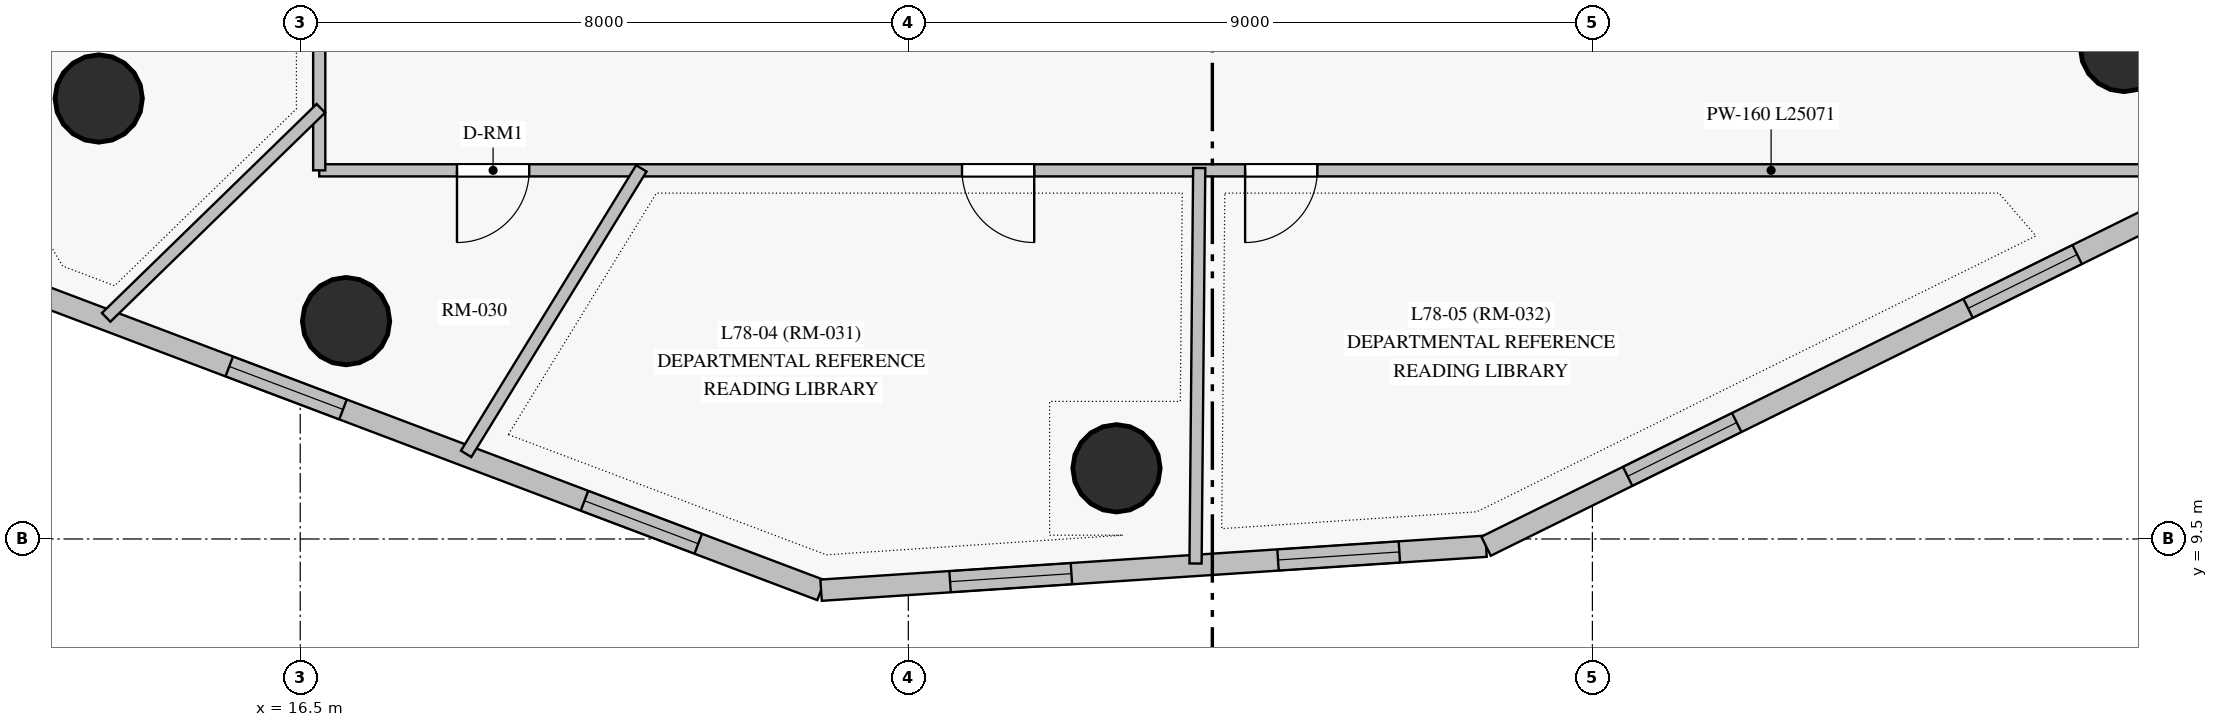
"""IFC4 building model, lengths in metres.
Left out: names, types, materials, properties, quantities, classifications, styles, units other than length and angle.
Written with IfcOpenShell. Run it as: python <this file> out.ifc"""

import sys

from ifc_helpers import new_model, si_unit, direction, frame, frame_2d, origin, origin_with_axes, origin_2d, place, context, subcontext, project, spatial, rectangle, circle, extrude, source, transform, mapped, element, fill, save


model = new_model("IFC4")
c1 = context("Model", 3, precision=1e-05, world=origin(), true_north=direction((0.0, 1.0)))
c2 = subcontext(c1, "Body", "Model", "MODEL_VIEW")
j1 = project(units=[si_unit("LENGTHUNIT", "METRE"), si_unit("PLANEANGLEUNIT", "RADIAN")], contexts=[c1])
p1 = place(None, origin())
s1 = spatial("IfcSite", under=j1, at=p1, CompositionType="ELEMENT")
p2 = place(p1, origin())
s2 = spatial("IfcBuilding", under=s1, at=p2, CompositionType="ELEMENT")
p3 = place(p2, frame((0.0, 0.0, 262.65)))
s3 = spatial("IfcBuildingStorey", under=s2, at=p3, CompositionType="ELEMENT", Elevation=262.65)
m1 = source(origin_with_axes(), c2, "Body", "SweptSolid", [
    extrude(circle(Radius=0.575, at=origin_2d()), origin(), (0.0, 0.0, 1.0), 3.05),
])
for number, where, z_axis, x_axis in (
    (1, (13.849, 15.295, 0.0), (0.0, 0.0, 1.0), (1.0, 0.0, 0.0)),
    (2, (17.103, 12.366, 0.0), (0.0, 0.0, 1.0), (1.0, 0.0, 0.0)),
    (3, (27.239, 10.43, 0.0), (0.0, 0.0, 1.0), (1.0, 0.0, 0.0)),
    (4, (40.494, 15.96, 0.0), (0.0, 0.0, 1.0), (1.0, 0.0, 0.0)),
):
    element("IfcColumn", number, at=place(p3, frame(where, z_axis=z_axis, x_axis=x_axis)), inside=s3, PredefinedType="COLUMN", context=c2, shape_type="MappedRepresentation", body=[
        mapped(m1, transform((0.0, 0.0, 0.0), scale=1.0)),
    ])
p4 = place(p3, frame((13.062, 12.717, 0.0), z_axis=(0.0, 0.0, 1.0), x_axis=(0.935383697979, -0.353634468844, 0.0)))
e5 = element("IfcWall", 5, at=p4, inside=s3, PredefinedType="SOLIDWALL", context=c2, shape_type="SweptSolid", body=[
    extrude(rectangle(XDim=11.001, YDim=0.28, at=frame_2d((5.5, 0.0))), origin(), (0.0, 0.0, 1.0), 2.85),
])
p5 = place(p4, frame((2.677, 0.0, 0.85)))
e6 = element("IfcOpeningElement", 6, at=p5, cuts=e5, PredefinedType="OPENING", context=c2, shape_type="SweptSolid", body=[
    extrude(rectangle(XDim=1.6, YDim=1.6, at=frame_2d((0.8, 0.8))), frame((0.0, 0.15, 0.0), z_axis=(0.0, -1.0, 0.0), x_axis=(1.0, 0.0, 0.0)), (0.0, 0.0, 1.0), 0.3),
])
p6 = place(p4, frame((7.673, 0.0, 0.85)))
e7 = element("IfcOpeningElement", 7, at=p6, cuts=e5, PredefinedType="OPENING", context=c2, shape_type="SweptSolid", body=[
    extrude(rectangle(XDim=1.6, YDim=1.6, at=frame_2d((0.8, 0.8))), frame((0.0, 0.15, 0.0), z_axis=(0.0, -1.0, 0.0), x_axis=(1.0, 0.0, 0.0)), (0.0, 0.0, 1.0), 0.3),
])
p7 = place(p3, frame((23.353, 8.826, 0.0), z_axis=(0.0, 0.0, 1.0), x_axis=(0.997820011646, 0.06599412367, 0.0)))
e8 = element("IfcWall", 8, at=p7, inside=s3, PredefinedType="SOLIDWALL", context=c2, shape_type="SweptSolid", body=[
    extrude(rectangle(XDim=8.768, YDim=0.28, at=frame_2d((4.384, 0.0))), origin(), (0.0, 0.0, 1.0), 2.85),
])
p8 = place(p7, frame((1.701, 0.0, 0.85)))
e9 = element("IfcOpeningElement", 9, at=p8, cuts=e8, PredefinedType="OPENING", context=c2, shape_type="SweptSolid", body=[
    extrude(rectangle(XDim=1.6, YDim=1.6, at=frame_2d((0.8, 0.8))), frame((0.0, 0.15, 0.0), z_axis=(0.0, -1.0, 0.0), x_axis=(1.0, 0.0, 0.0)), (0.0, 0.0, 1.0), 0.3),
])
p9 = place(p7, frame((6.024, 0.0, 0.85)))
e10 = element("IfcOpeningElement", 10, at=p9, cuts=e8, PredefinedType="OPENING", context=c2, shape_type="SweptSolid", body=[
    extrude(rectangle(XDim=1.6, YDim=1.6, at=frame_2d((0.8, 0.8))), frame((0.0, 0.15, 0.0), z_axis=(0.0, -1.0, 0.0), x_axis=(1.0, 0.0, 0.0)), (0.0, 0.0, 1.0), 0.3),
])
p10 = place(p3, frame((32.101, 9.405, 0.0), z_axis=(0.0, 0.0, 1.0), x_axis=(0.896764199355, 0.442508723931, 0.0)))
e11 = element("IfcWall", 11, at=p10, inside=s3, PredefinedType="SOLIDWALL", context=c2, shape_type="SweptSolid", body=[
    extrude(rectangle(XDim=11.93, YDim=0.28, at=frame_2d((5.965, 0.0))), origin(), (0.0, 0.0, 1.0), 2.85),
])
p11 = place(p10, frame((2.077, 0.0, 0.85)))
e12 = element("IfcOpeningElement", 12, at=p11, cuts=e11, PredefinedType="OPENING", context=c2, shape_type="SweptSolid", body=[
    extrude(rectangle(XDim=1.6, YDim=1.6, at=frame_2d((0.8, 0.8))), frame((0.0, 0.15, 0.0), z_axis=(0.0, -1.0, 0.0), x_axis=(1.0, 0.0, 0.0)), (0.0, 0.0, 1.0), 0.3),
])
p12 = place(p10, frame((7.072, 0.0, 0.85)))
e13 = element("IfcOpeningElement", 13, at=p12, cuts=e11, PredefinedType="OPENING", context=c2, shape_type="SweptSolid", body=[
    extrude(rectangle(XDim=1.6, YDim=1.6, at=frame_2d((0.8, 0.8))), frame((0.0, 0.15, 0.0), z_axis=(0.0, -1.0, 0.0), x_axis=(1.0, 0.0, 0.0)), (0.0, 0.0, 1.0), 0.3),
])
p13 = place(p3, frame((41.821, 14.35, 0.0), z_axis=(0.0, 0.0, 1.0), x_axis=(-1.0, 0.0, 0.0)))
e14 = element("IfcWall", 14, at=p13, inside=s3, PredefinedType="PARTITIONING", context=c2, shape_type="SweptSolid", body=[
    extrude(rectangle(XDim=25.071, YDim=0.16, at=frame_2d((12.536, 0.0))), origin(), (0.0, 0.0, 1.0), 2.3),
])
p14 = place(p13, frame((22.309, 0.0, 0.0)))
e15 = element("IfcOpeningElement", 15, at=p14, cuts=e14, PredefinedType="OPENING", context=c2, shape_type="SweptSolid", body=[
    extrude(rectangle(XDim=0.95, YDim=2.15, at=frame_2d((0.475, 1.075))), frame((0.0, 0.09, 0.0), z_axis=(0.0, -1.0, 0.0), x_axis=(1.0, 0.0, 0.0)), (0.0, 0.0, 1.0), 0.18),
])
p15 = place(p13, frame((15.665, 0.0, 0.0)))
e16 = element("IfcOpeningElement", 16, at=p15, cuts=e14, PredefinedType="OPENING", context=c2, shape_type="SweptSolid", body=[
    extrude(rectangle(XDim=0.95, YDim=2.15, at=frame_2d((0.475, 1.075))), frame((0.0, 0.09, 0.0), z_axis=(0.0, -1.0, 0.0), x_axis=(1.0, 0.0, 0.0)), (0.0, 0.0, 1.0), 0.18),
])
p16 = place(p13, frame((11.94, 0.0, 0.0)))
e17 = element("IfcOpeningElement", 17, at=p16, cuts=e14, PredefinedType="OPENING", context=c2, shape_type="SweptSolid", body=[
    extrude(rectangle(XDim=0.95, YDim=2.15, at=frame_2d((0.475, 1.075))), frame((0.0, 0.09, 0.0), z_axis=(0.0, -1.0, 0.0), x_axis=(1.0, 0.0, 0.0)), (0.0, 0.0, 1.0), 0.18),
])
p17 = place(p3, frame((16.75, 14.35, 0.0), z_axis=(0.0, 0.0, 1.0), x_axis=(0.0, 1.0, 0.0)))
e18 = element("IfcWall", 18, at=p17, inside=s3, PredefinedType="PARTITIONING", context=c2, shape_type="SweptSolid", body=[
    extrude(rectangle(XDim=17.3, YDim=0.16, at=frame_2d((8.65, 0.0))), origin(), (0.0, 0.0, 1.0), 2.45),
])
p18 = place(p17, frame((8.865, 0.0, 0.0)))
e19 = element("IfcOpeningElement", 19, at=p18, cuts=e18, PredefinedType="OPENING", context=c2, shape_type="SweptSolid", body=[
    extrude(rectangle(XDim=0.95, YDim=2.15, at=frame_2d((0.475, 1.075))), frame((0.0, 0.09, 0.0), z_axis=(0.0, -1.0, 0.0), x_axis=(1.0, 0.0, 0.0)), (0.0, 0.0, 1.0), 0.18),
])
p19 = place(p17, frame((5.58, 0.0, 0.0)))
e20 = element("IfcOpeningElement", 20, at=p19, cuts=e18, PredefinedType="OPENING", context=c2, shape_type="SweptSolid", body=[
    extrude(rectangle(XDim=0.96, YDim=2.15, at=frame_2d((0.48, 1.075))), frame((0.0, 0.09, 0.0), z_axis=(0.0, -1.0, 0.0), x_axis=(1.0, 0.0, 0.0)), (0.0, 0.0, 1.0), 0.18),
])
p20 = place(p17, frame((10.77, 0.0, 0.0)))
e21 = element("IfcOpeningElement", 21, at=p20, cuts=e18, PredefinedType="OPENING", context=c2, shape_type="SweptSolid", body=[
    extrude(rectangle(XDim=0.95, YDim=2.15, at=frame_2d((0.475, 1.075))), frame((0.0, 0.09, 0.0), z_axis=(0.0, -1.0, 0.0), x_axis=(1.0, 0.0, 0.0)), (0.0, 0.0, 1.0), 0.18),
])
p21 = place(p17, frame((15.523, 0.0, 0.0)))
e22 = element("IfcOpeningElement", 22, at=p21, cuts=e18, PredefinedType="OPENING", context=c2, shape_type="SweptSolid", body=[
    extrude(rectangle(XDim=0.86, YDim=2.04, at=frame_2d((0.43, 1.02))), frame((0.0, 0.09, 0.0), z_axis=(0.0, -1.0, 0.0), x_axis=(1.0, 0.0, 0.0)), (0.0, 0.0, 1.0), 0.18),
])
p22 = place(p3, frame((28.327, 14.38, 0.0), z_axis=(0.0, 0.0, 1.0), x_axis=(-0.009337931662, -0.999956400566, 0.0)))
e23 = element("IfcWall", 23, at=p22, inside=s3, PredefinedType="PARTITIONING", context=c2, shape_type="SweptSolid", body=[
    extrude(rectangle(XDim=5.203, YDim=0.16, at=frame_2d((2.602, 0.0))), origin(), (0.0, 0.0, 1.0), 2.85),
])
p23 = place(p3, frame((20.988, 14.375, 0.0), z_axis=(0.0, 0.0, 1.0), x_axis=(-0.52315433161, -0.852237962847, 0.0)))
e24 = element("IfcWall", 24, at=p23, inside=s3, PredefinedType="PARTITIONING", context=c2, shape_type="SweptSolid", body=[
    extrude(rectangle(XDim=4.407, YDim=0.16, at=frame_2d((2.203, 0.0))), origin(), (0.0, 0.0, 1.0), 2.85),
])
p24 = place(p3, frame((16.771, 15.165, 0.0), z_axis=(0.0, 0.0, 1.0), x_axis=(-0.716518431259, -0.697568159871, 0.0)))
e25 = element("IfcWall", 25, at=p24, inside=s3, PredefinedType="PARTITIONING", context=c2, shape_type="SweptSolid", body=[
    extrude(rectangle(XDim=3.942, YDim=0.16, at=frame_2d((1.971, 0.0))), origin(), (0.0, 0.0, 1.0), 2.85),
])
m2 = source(origin_with_axes(), c2, "Body", "SweptSolid", [
    extrude(rectangle(XDim=1.6, YDim=1.6, at=frame_2d((0.8, 0.8))), frame((0.0, 0.03, 0.0), z_axis=(0.0, -1.0, 0.0), x_axis=(1.0, 0.0, 0.0)), (0.0, 0.0, 1.0), 0.06),
])
p25 = place(p5, origin())
e26 = element("IfcWindow", 26, at=p25, inside=s3, PartitioningType="SINGLE_PANEL", PredefinedType="WINDOW", context=c2, shape_type="MappedRepresentation", body=[
    mapped(m2, transform((0.0, 0.0, 0.0), scale=1.0)),
])
fill(e6, e26)
p26 = place(p6, origin())
e27 = element("IfcWindow", 27, at=p26, inside=s3, PartitioningType="SINGLE_PANEL", PredefinedType="WINDOW", context=c2, shape_type="MappedRepresentation", body=[
    mapped(m2, transform((0.0, 0.0, 0.0), scale=1.0)),
])
fill(e7, e27)
p27 = place(p8, origin())
e28 = element("IfcWindow", 28, at=p27, inside=s3, PartitioningType="SINGLE_PANEL", PredefinedType="WINDOW", context=c2, shape_type="MappedRepresentation", body=[
    mapped(m2, transform((0.0, 0.0, 0.0), scale=1.0)),
])
fill(e9, e28)
p28 = place(p9, origin())
e29 = element("IfcWindow", 29, at=p28, inside=s3, PartitioningType="SINGLE_PANEL", PredefinedType="WINDOW", context=c2, shape_type="MappedRepresentation", body=[
    mapped(m2, transform((0.0, 0.0, 0.0), scale=1.0)),
])
fill(e10, e29)
p29 = place(p11, origin())
e30 = element("IfcWindow", 30, at=p29, inside=s3, PartitioningType="SINGLE_PANEL", PredefinedType="WINDOW", context=c2, shape_type="MappedRepresentation", body=[
    mapped(m2, transform((0.0, 0.0, 0.0), scale=1.0)),
])
fill(e12, e30)
p30 = place(p12, origin())
e31 = element("IfcWindow", 31, at=p30, inside=s3, PartitioningType="SINGLE_PANEL", PredefinedType="WINDOW", context=c2, shape_type="MappedRepresentation", body=[
    mapped(m2, transform((0.0, 0.0, 0.0), scale=1.0)),
])
fill(e13, e31)
m3 = source(origin_with_axes(), c2, "Body", "SweptSolid", [
    extrude(rectangle(XDim=0.95, YDim=2.15, at=frame_2d((0.475, 1.075))), frame((0.0, 0.025, 0.0), z_axis=(0.0, -1.0, 0.0), x_axis=(1.0, 0.0, 0.0)), (0.0, 0.0, 1.0), 0.05),
])
p31 = place(p14, origin())
e32 = element("IfcDoor", 32, at=p31, inside=s3, OperationType="SINGLE_SWING_RIGHT", PredefinedType="DOOR", context=c2, shape_type="MappedRepresentation", body=[
    mapped(m3, transform((0.0, 0.0, 0.0), scale=1.0)),
])
fill(e15, e32)
p32 = place(p15, origin())
e33 = element("IfcDoor", 33, at=p32, inside=s3, OperationType="SINGLE_SWING_LEFT", PredefinedType="DOOR", context=c2, shape_type="MappedRepresentation", body=[
    mapped(m3, transform((0.0, 0.0, 0.0), scale=1.0)),
])
fill(e16, e33)
p33 = place(p16, origin())
e34 = element("IfcDoor", 34, at=p33, inside=s3, OperationType="SINGLE_SWING_RIGHT", PredefinedType="DOOR", context=c2, shape_type="MappedRepresentation", body=[
    mapped(m3, transform((0.0, 0.0, 0.0), scale=1.0)),
])
fill(e17, e34)
save(model, sys.argv[1])
